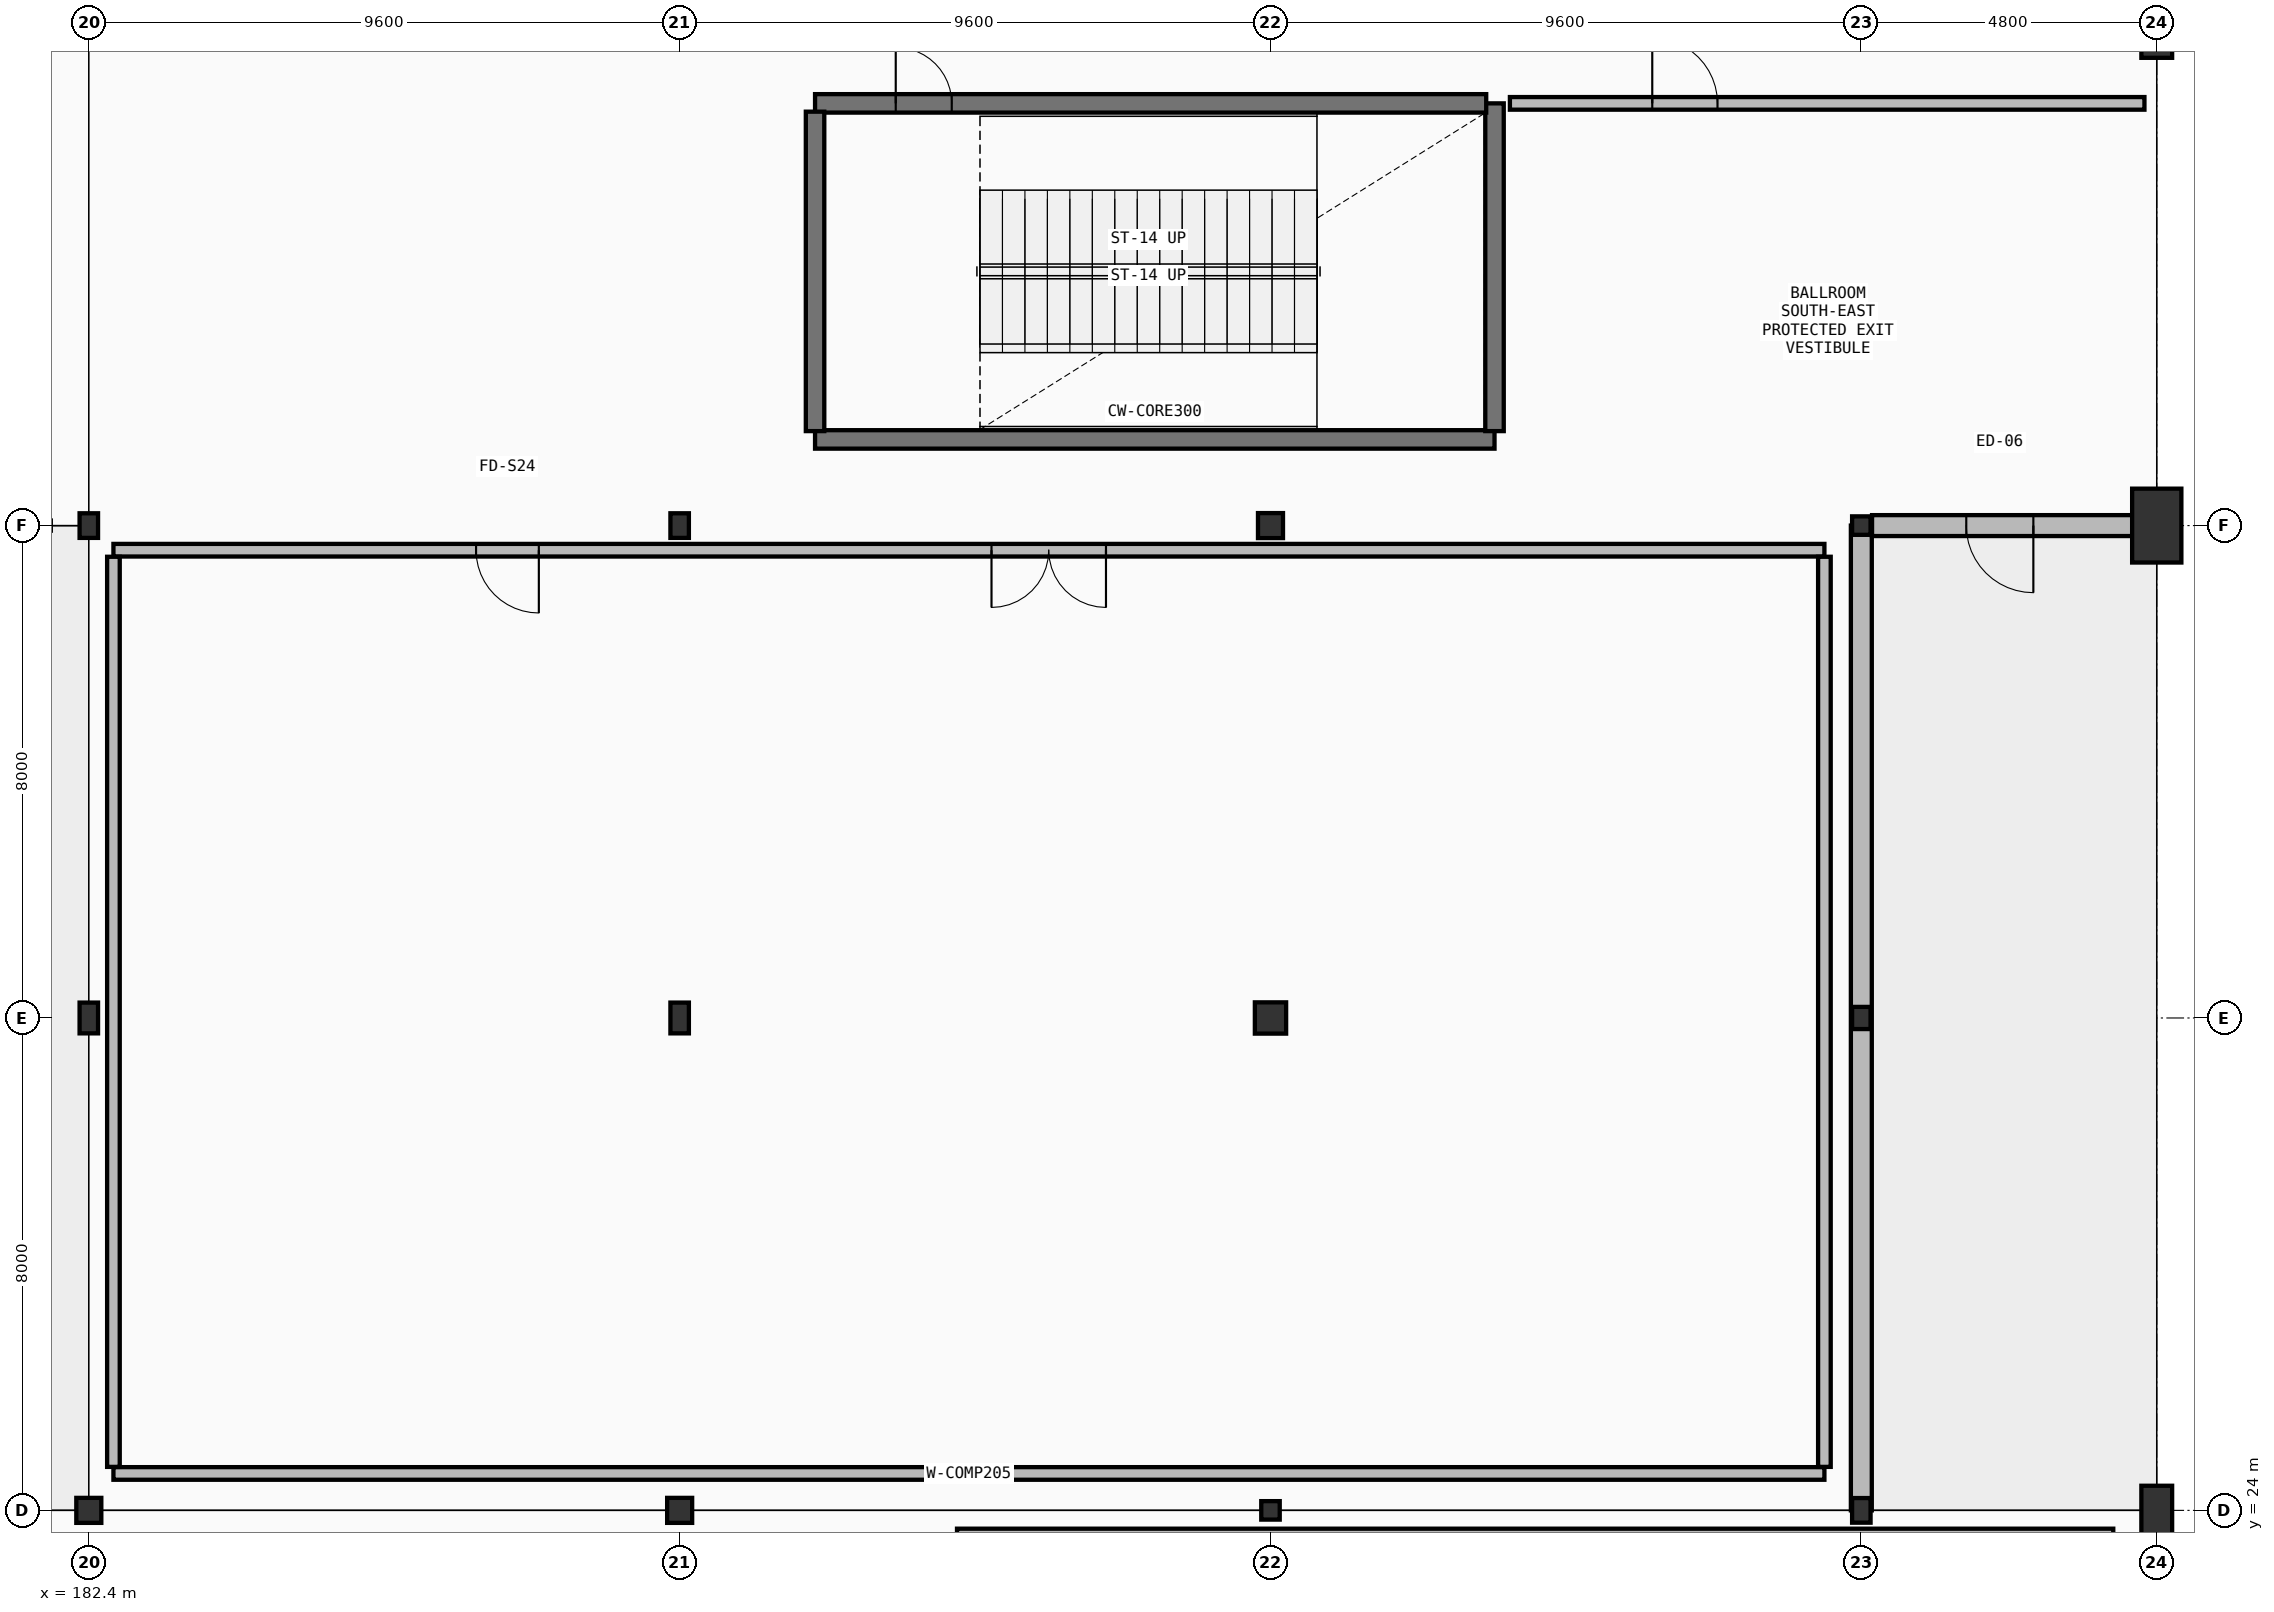
"""IFC4 building model, lengths in metres.
Left out: names, types, materials, properties, quantities, classifications, styles, units other than length and angle.
Written with IfcOpenShell. Run it as: python <this file> out.ifc"""

import sys

from ifc_helpers import new_model, si_unit, direction, frame, frame_2d, origin, origin_2d, place, context, subcontext, project, spatial, rectangle, hollow_circle, i_section, extrude, element, fill, save


model = new_model("IFC4")
c1 = context("Model", 3, precision=1e-05, world=origin(), true_north=direction((0.0, 1.0)))
c2 = subcontext(c1, "Body", "Model", "MODEL_VIEW")
j1 = project(units=[si_unit("LENGTHUNIT", "METRE"), si_unit("PLANEANGLEUNIT", "RADIAN")], contexts=[c1])
p1 = place(None, origin())
s1 = spatial("IfcSite", under=j1, at=p1, CompositionType="ELEMENT")
p2 = place(p1, origin())
s2 = spatial("IfcBuilding", under=s1, at=p2, CompositionType="ELEMENT")
p3 = place(p2, origin())
s3 = spatial("IfcBuildingStorey", under=s2, at=p3, CompositionType="ELEMENT", Elevation=0.0)
p4 = place(p3, frame((182.4, 24.0, 0.0), z_axis=(0.0, 0.0, 1.0), x_axis=(1.0, 0.0, 0.0)))
e1 = element("IfcColumn", 1, at=p4, inside=s3, PredefinedType="COLUMN", context=c2, shape_type="SweptSolid", body=[
    extrude(hollow_circle(Radius=0.203, WallThickness=0.02, at=origin_2d()), origin(), (0.0, 0.0, 1.0), 6.0),
])
p5 = place(p3, frame((182.4, 32.0, 0.0), z_axis=(0.0, 0.0, 1.0), x_axis=(1.0, 0.0, 0.0)))
e2 = element("IfcColumn", 2, at=p5, inside=s3, PredefinedType="COLUMN", context=c2, shape_type="SweptSolid", body=[
    extrude(i_section(OverallWidth=0.3, OverallDepth=0.5, WebThickness=0.014, FlangeThickness=0.028, FilletRadius=0.027, at=origin_2d()), origin(), (0.0, 0.0, 1.0), 6.0),
])
p6 = place(p3, frame((182.4, 40.0, 0.0), z_axis=(0.0, 0.0, 1.0), x_axis=(1.0, 0.0, 0.0)))
e3 = element("IfcColumn", 3, at=p6, inside=s3, PredefinedType="COLUMN", context=c2, shape_type="SweptSolid", body=[
    extrude(i_section(OverallWidth=0.3, OverallDepth=0.4, WebThickness=0.013, FlangeThickness=0.024, FilletRadius=0.027, at=origin_2d()), origin(), (0.0, 0.0, 1.0), 6.0),
])
p7 = place(p3, frame((192.0, 24.0, 0.0), z_axis=(0.0, 0.0, 1.0), x_axis=(1.0, 0.0, 0.0)))
e4 = element("IfcColumn", 4, at=p7, inside=s3, PredefinedType="COLUMN", context=c2, shape_type="SweptSolid", body=[
    extrude(hollow_circle(Radius=0.203, WallThickness=0.02, at=origin_2d()), origin(), (0.0, 0.0, 1.0), 6.0),
])
p8 = place(p3, frame((192.0, 32.0, 0.0), z_axis=(0.0, 0.0, 1.0), x_axis=(1.0, 0.0, 0.0)))
e5 = element("IfcColumn", 5, at=p8, inside=s3, PredefinedType="COLUMN", context=c2, shape_type="SweptSolid", body=[
    extrude(i_section(OverallWidth=0.3, OverallDepth=0.5, WebThickness=0.014, FlangeThickness=0.028, FilletRadius=0.027, at=origin_2d()), origin(), (0.0, 0.0, 1.0), 6.0),
])
p9 = place(p3, frame((192.0, 40.0, 0.0), z_axis=(0.0, 0.0, 1.0), x_axis=(1.0, 0.0, 0.0)))
e6 = element("IfcColumn", 6, at=p9, inside=s3, PredefinedType="COLUMN", context=c2, shape_type="SweptSolid", body=[
    extrude(i_section(OverallWidth=0.3, OverallDepth=0.4, WebThickness=0.013, FlangeThickness=0.024, FilletRadius=0.027, at=origin_2d()), origin(), (0.0, 0.0, 1.0), 6.0),
])
p10 = place(p3, frame((201.6, 24.0, 0.0), z_axis=(0.0, 0.0, 1.0), x_axis=(1.0, 0.0, 0.0)))
e7 = element("IfcColumn", 7, at=p10, inside=s3, PredefinedType="COLUMN", context=c2, shape_type="SweptSolid", body=[
    extrude(i_section(OverallWidth=0.3, OverallDepth=0.3, WebThickness=0.011, FlangeThickness=0.019, FilletRadius=0.027, at=origin_2d()), origin(), (0.0, 0.0, 1.0), 6.0),
])
p11 = place(p3, frame((201.6, 32.0, 0.0), z_axis=(0.0, 0.0, 1.0), x_axis=(1.0, 0.0, 0.0)))
e8 = element("IfcColumn", 8, at=p11, inside=s3, PredefinedType="COLUMN", context=c2, shape_type="SweptSolid", body=[
    extrude(hollow_circle(Radius=0.254, WallThickness=0.025, at=origin_2d()), origin(), (0.0, 0.0, 1.0), 6.0),
])
p12 = place(p3, frame((201.6, 40.0, 0.0), z_axis=(0.0, 0.0, 1.0), x_axis=(1.0, 0.0, 0.0)))
e9 = element("IfcColumn", 9, at=p12, inside=s3, PredefinedType="COLUMN", context=c2, shape_type="SweptSolid", body=[
    extrude(hollow_circle(Radius=0.203, WallThickness=0.02, at=origin_2d()), origin(), (0.0, 0.0, 1.0), 6.0),
])
p13 = place(p3, frame((211.2, 24.0, 0.0), z_axis=(0.0, 0.0, 1.0), x_axis=(1.0, 0.0, 0.0)))
e10 = element("IfcColumn", 10, at=p13, inside=s3, PredefinedType="COLUMN", context=c2, shape_type="SweptSolid", body=[
    extrude(i_section(OverallWidth=0.3, OverallDepth=0.4, WebThickness=0.013, FlangeThickness=0.024, FilletRadius=0.027, at=origin_2d()), origin(), (0.0, 0.0, 1.0), 6.0),
])
p14 = place(p3, frame((211.2, 32.0, 0.0), z_axis=(0.0, 0.0, 1.0), x_axis=(1.0, 0.0, 0.0)))
e11 = element("IfcColumn", 11, at=p14, inside=s3, PredefinedType="COLUMN", context=c2, shape_type="SweptSolid", body=[
    extrude(i_section(OverallWidth=0.3, OverallDepth=0.36, WebThickness=0.012, FlangeThickness=0.022, FilletRadius=0.027, at=origin_2d()), origin(), (0.0, 0.0, 1.0), 6.0),
])
p15 = place(p3, frame((211.2, 40.0, 0.0), z_axis=(0.0, 0.0, 1.0), x_axis=(1.0, 0.0, 0.0)))
e12 = element("IfcColumn", 12, at=p15, inside=s3, PredefinedType="COLUMN", context=c2, shape_type="SweptSolid", body=[
    extrude(i_section(OverallWidth=0.3, OverallDepth=0.3, WebThickness=0.011, FlangeThickness=0.019, FilletRadius=0.027, at=origin_2d()), origin(), (0.0, 0.0, 1.0), 6.0),
])
p16 = place(p3, frame((216.0, 24.0, -5.4), z_axis=(0.0, 0.0, 1.0), x_axis=(1.0, 0.0, 0.0)))
e13 = element("IfcColumn", 13, at=p16, inside=s3, PredefinedType="PILASTER", context=c2, shape_type="SweptSolid", body=[
    extrude(rectangle(XDim=0.5, YDim=0.8, at=origin_2d()), origin(), (0.0, 0.0, 1.0), 11.4),
])
p17 = place(p3, frame((216.0, 40.0, -5.4), z_axis=(0.0, 0.0, 1.0), x_axis=(1.0, 0.0, 0.0)))
e14 = element("IfcColumn", 14, at=p17, inside=s3, PredefinedType="PILASTER", context=c2, shape_type="SweptSolid", body=[
    extrude(rectangle(XDim=0.8, YDim=1.2, at=origin_2d()), origin(), (0.0, 0.0, 1.0), 11.4),
])
p18 = place(p3, frame((216.0, 48.0, -5.4), z_axis=(0.0, 0.0, 1.0), x_axis=(1.0, 0.0, 0.0)))
e15 = element("IfcColumn", 15, at=p18, inside=s3, PredefinedType="PILASTER", context=c2, shape_type="SweptSolid", body=[
    extrude(rectangle(XDim=0.5, YDim=0.8, at=origin_2d()), origin(), (0.0, 0.0, 1.0), 11.4),
])
p19 = place(p3, frame((216.0, 12.0, 0.0), z_axis=(0.0, 0.0, 1.0), x_axis=(0.0, 1.0, 0.0)))
e16 = element("IfcWall", 16, at=p19, inside=s3, PredefinedType="SOLIDWALL", context=c2, shape_type="SweptSolid", body=[
    extrude(rectangle(XDim=12.0, YDim=0.34, at=frame_2d((6.0, 0.0))), origin(), (0.0, 0.0, 1.0), 5.09),
])
p20 = place(p3, frame((205.24, 41.4, 0.0), z_axis=(0.0, 0.0, 1.0), x_axis=(-1.0, 0.0, 0.0)))
e17 = element("IfcWall", 17, at=p20, inside=s3, PredefinedType="SHEAR", context=c2, shape_type="SweptSolid", body=[
    extrude(rectangle(XDim=11.04, YDim=0.3, at=frame_2d((5.52, 0.0))), origin(), (0.0, 0.0, 1.0), 5.75),
])
p21 = place(p3, frame((205.24, 46.86, 0.0), z_axis=(0.0, 0.0, 1.0), x_axis=(0.0, -1.0, 0.0)))
e18 = element("IfcWall", 18, at=p21, inside=s3, PredefinedType="SHEAR", context=c2, shape_type="SweptSolid", body=[
    extrude(rectangle(XDim=5.325, YDim=0.3, at=frame_2d((2.663, 0.0))), origin(), (0.0, 0.0, 1.0), 5.75),
])
p22 = place(p3, frame((194.2, 46.86, 0.0), z_axis=(0.0, 0.0, 1.0), x_axis=(1.0, 0.0, 0.0)))
e19 = element("IfcWall", 19, at=p22, inside=s3, PredefinedType="SHEAR", context=c2, shape_type="SweptSolid", body=[
    extrude(rectangle(XDim=10.905, YDim=0.3, at=frame_2d((5.453, 0.0))), origin(), (0.0, 0.0, 1.0), 5.75),
])
p23 = place(p22, frame((1.311, 0.0, 0.0)))
e20 = element("IfcOpeningElement", 20, at=p23, cuts=e19, PredefinedType="OPENING", context=c2, shape_type="SweptSolid", body=[
    extrude(rectangle(XDim=0.91, YDim=2.08, at=frame_2d((0.455, 1.04))), frame((0.0, 0.16, 0.0), z_axis=(0.0, -1.0, 0.0), x_axis=(1.0, 0.0, 0.0)), (0.0, 0.0, 1.0), 0.32),
])
p24 = place(p3, frame((194.2, 41.535, 0.0), z_axis=(0.0, 0.0, 1.0), x_axis=(0.0, 1.0, 0.0)))
e21 = element("IfcWall", 21, at=p24, inside=s3, PredefinedType="SHEAR", context=c2, shape_type="SweptSolid", body=[
    extrude(rectangle(XDim=5.19, YDim=0.3, at=frame_2d((2.595, 0.0))), origin(), (0.0, 0.0, 1.0), 5.75),
])
p25 = place(p3, frame((210.6, 39.6, 0.0), z_axis=(0.0, 0.0, 1.0), x_axis=(-1.0, 0.0, 0.0)))
e22 = element("IfcWall", 22, at=p25, inside=s3, PredefinedType="SOLIDWALL", context=c2, shape_type="SweptSolid", body=[
    extrude(rectangle(XDim=27.8, YDim=0.205, at=frame_2d((13.9, 0.0))), origin(), (0.0, 0.0, 1.0), 5.12),
])
p26 = place(p25, frame((11.673, 0.0, 0.0)))
e23 = element("IfcOpeningElement", 23, at=p26, cuts=e22, PredefinedType="OPENING", context=c2, shape_type="SweptSolid", body=[
    extrude(rectangle(XDim=1.86, YDim=2.32, at=frame_2d((0.93, 1.16))), frame((0.0, 0.113, 0.0), z_axis=(0.0, -1.0, 0.0), x_axis=(1.0, 0.0, 0.0)), (0.0, 0.0, 1.0), 0.225),
])
p27 = place(p25, frame((20.888, 0.0, 0.0)))
e24 = element("IfcOpeningElement", 24, at=p27, cuts=e22, PredefinedType="OPENING", context=c2, shape_type="SweptSolid", body=[
    extrude(rectangle(XDim=1.02, YDim=2.32, at=frame_2d((0.51, 1.16))), frame((0.0, 0.113, 0.0), z_axis=(0.0, -1.0, 0.0), x_axis=(1.0, 0.0, 0.0)), (0.0, 0.0, 1.0), 0.225),
])
p28 = place(p3, frame((182.8, 24.6, 0.0), z_axis=(0.0, 0.0, 1.0), x_axis=(1.0, 0.0, 0.0)))
e25 = element("IfcWall", 25, at=p28, inside=s3, PredefinedType="SOLIDWALL", context=c2, shape_type="SweptSolid", body=[
    extrude(rectangle(XDim=27.8, YDim=0.205, at=frame_2d((13.9, 0.0))), origin(), (0.0, 0.0, 1.0), 5.02),
])
p29 = place(p3, frame((210.6, 24.707, 0.0), z_axis=(0.0, 0.0, 1.0), x_axis=(0.0, 1.0, 0.0)))
e26 = element("IfcWall", 26, at=p29, inside=s3, PredefinedType="SOLIDWALL", context=c2, shape_type="SweptSolid", body=[
    extrude(rectangle(XDim=14.787, YDim=0.205, at=frame_2d((7.394, 0.0))), origin(), (0.0, 0.0, 1.0), 5.17),
])
p30 = place(p3, frame((182.8, 39.493, 0.0), z_axis=(0.0, 0.0, 1.0), x_axis=(0.0, -1.0, 0.0)))
e27 = element("IfcWall", 27, at=p30, inside=s3, PredefinedType="SOLIDWALL", context=c2, shape_type="SweptSolid", body=[
    extrude(rectangle(XDim=14.787, YDim=0.205, at=frame_2d((7.394, 0.0))), origin(), (0.0, 0.0, 1.0), 5.02),
])
p31 = place(p3, frame((215.293, 23.6, 0.0), z_axis=(0.0, 0.0, 1.0), x_axis=(-1.0, 0.0, 0.0)))
e28 = element("IfcWall", 28, at=p31, inside=s3, PredefinedType="SOLIDWALL", context=c2, shape_type="SweptSolid", body=[
    extrude(rectangle(XDim=18.787, YDim=0.205, at=frame_2d((9.394, 0.0))), origin(), (0.0, 0.0, 1.0), 5.04),
])
p32 = place(p3, frame((211.2, 40.0, 0.0), z_axis=(0.0, 0.0, 1.0), x_axis=(0.0, -1.0, 0.0)))
e29 = element("IfcWall", 29, at=p32, inside=s3, PredefinedType="SOLIDWALL", context=c2, shape_type="SweptSolid", body=[
    extrude(rectangle(XDim=16.0, YDim=0.34, at=frame_2d((8.0, 0.0))), origin(), (0.0, 0.0, 1.0), 5.09),
])
p33 = place(p3, frame((216.0, 40.0, 0.0), z_axis=(0.0, 0.0, 1.0), x_axis=(-1.0, 0.0, 0.0)))
e30 = element("IfcWall", 30, at=p33, inside=s3, PredefinedType="SOLIDWALL", context=c2, shape_type="SweptSolid", body=[
    extrude(rectangle(XDim=4.626, YDim=0.34, at=frame_2d((2.313, 0.0))), origin(), (0.0, 0.0, 1.0), 5.27),
])
p34 = place(p33, frame((2.005, 0.0, 0.0)))
e31 = element("IfcOpeningElement", 31, at=p34, cuts=e30, PredefinedType="OPENING", context=c2, shape_type="SweptSolid", body=[
    extrude(rectangle(XDim=1.09, YDim=2.22, at=frame_2d((0.545, 1.11))), frame((0.0, 0.18, 0.0), z_axis=(0.0, -1.0, 0.0), x_axis=(1.0, 0.0, 0.0)), (0.0, 0.0, 1.0), 0.36),
])
p35 = place(p3, frame((205.49, 46.86, 0.0), z_axis=(0.0, 0.0, 1.0), x_axis=(1.0, 0.0, 0.0)))
e32 = element("IfcWall", 32, at=p35, inside=s3, PredefinedType="SOLIDWALL", context=c2, shape_type="SweptSolid", body=[
    extrude(rectangle(XDim=10.31, YDim=0.205, at=frame_2d((5.155, 0.0))), origin(), (0.0, 0.0, 1.0), 5.17),
])
p36 = place(p35, frame((2.313, 0.0, 0.0)))
e33 = element("IfcOpeningElement", 33, at=p36, cuts=e32, PredefinedType="OPENING", context=c2, shape_type="SweptSolid", body=[
    extrude(rectangle(XDim=1.06, YDim=2.16, at=frame_2d((0.53, 1.08))), frame((0.0, 0.113, 0.0), z_axis=(0.0, -1.0, 0.0), x_axis=(1.0, 0.0, 0.0)), (0.0, 0.0, 1.0), 0.225),
])
p37 = place(p23, origin())
e34 = element("IfcDoor", 34, at=p37, inside=s3, OperationType="SINGLE_SWING_LEFT", PredefinedType="DOOR", context=c2, shape_type="SweptSolid", body=[
    extrude(rectangle(XDim=0.91, YDim=2.08, at=frame_2d((0.455, 1.04))), frame((0.0, 0.025, 0.0), z_axis=(0.0, -1.0, 0.0), x_axis=(1.0, 0.0, 0.0)), (0.0, 0.0, 1.0), 0.05),
])
fill(e20, e34)
p38 = place(p26, origin())
e35 = element("IfcDoor", 35, at=p38, inside=s3, OperationType="DOUBLE_DOOR_SINGLE_SWING", PredefinedType="DOOR", context=c2, shape_type="SweptSolid", body=[
    extrude(rectangle(XDim=1.86, YDim=2.32, at=frame_2d((0.93, 1.16))), frame((0.0, 0.025, 0.0), z_axis=(0.0, -1.0, 0.0), x_axis=(1.0, 0.0, 0.0)), (0.0, 0.0, 1.0), 0.05),
])
fill(e23, e35)
p39 = place(p27, origin())
e36 = element("IfcDoor", 36, at=p39, inside=s3, OperationType="SINGLE_SWING_RIGHT", PredefinedType="DOOR", context=c2, shape_type="SweptSolid", body=[
    extrude(rectangle(XDim=1.02, YDim=2.32, at=frame_2d((0.51, 1.16))), frame((0.0, 0.025, 0.0), z_axis=(0.0, -1.0, 0.0), x_axis=(1.0, 0.0, 0.0)), (0.0, 0.0, 1.0), 0.05),
])
fill(e24, e36)
p40 = place(p34, origin())
e37 = element("IfcDoor", 37, at=p40, inside=s3, OperationType="SINGLE_SWING_LEFT", PredefinedType="DOOR", context=c2, shape_type="SweptSolid", body=[
    extrude(rectangle(XDim=1.09, YDim=2.22, at=frame_2d((0.545, 1.11))), frame((0.0, 0.025, 0.0), z_axis=(0.0, -1.0, 0.0), x_axis=(1.0, 0.0, 0.0)), (0.0, 0.0, 1.0), 0.05),
])
fill(e31, e37)
p41 = place(p36, origin())
e38 = element("IfcDoor", 38, at=p41, inside=s3, OperationType="SINGLE_SWING_LEFT", PredefinedType="DOOR", context=c2, shape_type="SweptSolid", body=[
    extrude(rectangle(XDim=1.06, YDim=2.16, at=frame_2d((0.53, 1.08))), frame((0.0, 0.025, 0.0), z_axis=(0.0, -1.0, 0.0), x_axis=(1.0, 0.0, 0.0)), (0.0, 0.0, 1.0), 0.05),
])
fill(e33, e38)
save(model, sys.argv[1])
